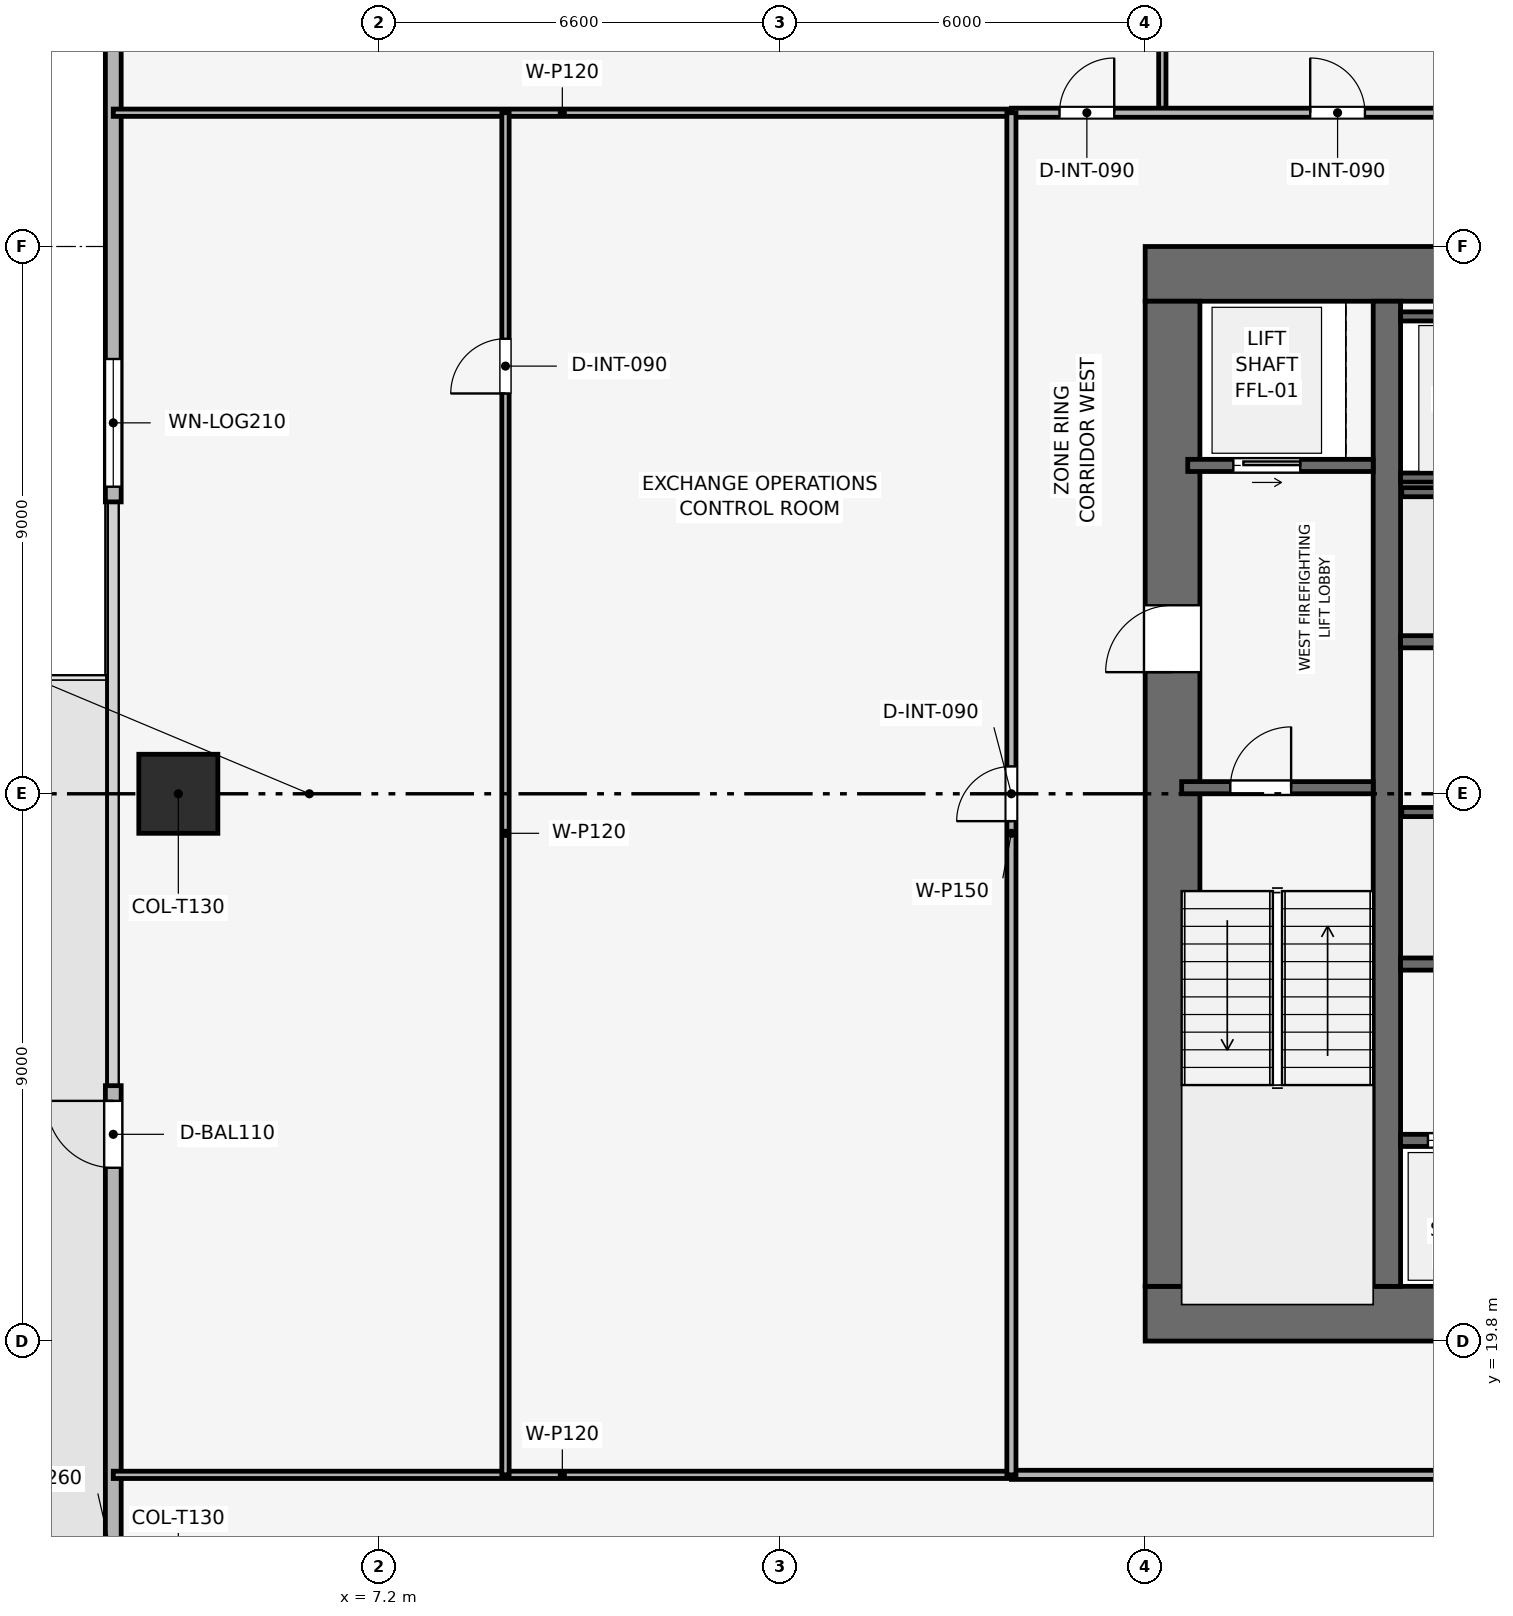
"""IFC4 building model, lengths in metres.
Left out: names, types, materials, properties, quantities, classifications, styles, units other than length and angle.
Written with IfcOpenShell. Run it as: python <this file> out.ifc"""

import sys

from ifc_helpers import new_model, si_unit, direction, frame, frame_2d, origin, origin_2d, place, context, subcontext, project, spatial, rectangle, extrude, element, fill, save


model = new_model("IFC4")
c1 = context("Model", 3, precision=1e-05, world=origin(), true_north=direction((0.0, 1.0)))
c2 = subcontext(c1, "Body", "Model", "MODEL_VIEW")
j1 = project(units=[si_unit("LENGTHUNIT", "METRE"), si_unit("PLANEANGLEUNIT", "RADIAN")], contexts=[c1])
p1 = place(None, origin())
s1 = spatial("IfcSite", under=j1, at=p1, CompositionType="ELEMENT")
p2 = place(p1, origin())
s2 = spatial("IfcBuilding", under=s1, at=p2, CompositionType="ELEMENT")
p3 = place(p2, frame((0.0, 0.0, 129.0)))
s3 = spatial("IfcBuildingStorey", under=s2, at=p3, CompositionType="ELEMENT", Elevation=129.0)
p4 = place(p3, frame((19.8, 20.25, 0.0), z_axis=(0.0, 0.0, 1.0), x_axis=(1.0, 0.0, 0.0)))
e1 = element("IfcWall", 1, at=p4, inside=s3, PredefinedType="SHEAR", context=c2, shape_type="SweptSolid", body=[
    extrude(rectangle(XDim=18.0, YDim=0.9, at=frame_2d((9.0, 0.0))), origin(), (0.0, 0.0, 1.0), 3.9),
])
p5 = place(p4, frame((8.4, 0.0, 0.0)))
e2 = element("IfcOpeningElement", 2, at=p5, cuts=e1, PredefinedType="OPENING", context=c2, shape_type="SweptSolid", body=[
    extrude(rectangle(XDim=1.2, YDim=2.2, at=frame_2d((0.6, 1.1))), frame((0.0, 0.46, 0.0), z_axis=(0.0, -1.0, 0.0), x_axis=(1.0, 0.0, 0.0)), (0.0, 0.0, 1.0), 0.92),
])
p6 = place(p3, frame((19.8, 37.35, 0.0), z_axis=(0.0, 0.0, 1.0), x_axis=(1.0, 0.0, 0.0)))
e3 = element("IfcWall", 3, at=p6, inside=s3, PredefinedType="SHEAR", context=c2, shape_type="SweptSolid", body=[
    extrude(rectangle(XDim=18.0, YDim=0.9, at=frame_2d((9.0, 0.0))), origin(), (0.0, 0.0, 1.0), 3.9),
])
p7 = place(p6, frame((7.05, 0.0, 0.0)))
e4 = element("IfcOpeningElement", 4, at=p7, cuts=e3, PredefinedType="OPENING", context=c2, shape_type="SweptSolid", body=[
    extrude(rectangle(XDim=1.1, YDim=2.15, at=frame_2d((0.55, 1.075))), frame((0.0, 0.46, 0.0), z_axis=(0.0, -1.0, 0.0), x_axis=(1.0, 0.0, 0.0)), (0.0, 0.0, 1.0), 0.92),
])
p8 = place(p3, frame((20.25, 20.7, 0.0), z_axis=(0.0, 0.0, 1.0), x_axis=(0.0, 1.0, 0.0)))
e5 = element("IfcWall", 5, at=p8, inside=s3, PredefinedType="SHEAR", context=c2, shape_type="SweptSolid", body=[
    extrude(rectangle(XDim=16.2, YDim=0.9, at=frame_2d((8.1, 0.0))), origin(), (0.0, 0.0, 1.0), 3.9),
])
p9 = place(p8, frame((10.1, 0.0, 0.0)))
e6 = element("IfcOpeningElement", 6, at=p9, cuts=e5, PredefinedType="OPENING", context=c2, shape_type="SweptSolid", body=[
    extrude(rectangle(XDim=1.1, YDim=2.15, at=frame_2d((0.55, 1.075))), frame((0.0, 0.46, 0.0), z_axis=(0.0, -1.0, 0.0), x_axis=(1.0, 0.0, 0.0)), (0.0, 0.0, 1.0), 0.92),
])
p10 = place(p3, frame((23.775, 20.7, 0.0), z_axis=(0.0, 0.0, 1.0), x_axis=(0.0, 1.0, 0.0)))
e7 = element("IfcWall", 7, at=p10, inside=s3, PredefinedType="SHEAR", context=c2, shape_type="SweptSolid", body=[
    extrude(rectangle(XDim=16.2, YDim=0.45, at=frame_2d((8.1, 0.0))), origin(), (0.0, 0.0, 1.0), 3.9),
])
p11 = place(p3, frame((3.9, 28.8, 0.003), z_axis=(0.0, 0.0, 1.0), x_axis=(1.0, 0.0, 0.0)))
e8 = element("IfcColumn", 8, at=p11, inside=s3, PredefinedType="COLUMN", context=c2, shape_type="SweptSolid", body=[
    extrude(rectangle(XDim=1.3, YDim=1.3, at=origin_2d()), origin(), (0.0, 0.0, 1.0), 3.644),
])
p12 = place(p3, frame((2.83, 9.9, 0.0), z_axis=(0.0, 0.0, 1.0), x_axis=(0.0, 1.0, 0.0)))
e9 = element("IfcWall", 9, at=p12, inside=s3, PredefinedType="SOLIDWALL", context=c2, shape_type="SweptSolid", body=[
    extrude(rectangle(XDim=14.1, YDim=0.26, at=frame_2d((7.05, 0.0))), origin(), (0.0, 0.0, 1.0), 3.65),
])
p13 = place(p12, frame((12.75, 0.0, 0.0)))
e10 = element("IfcOpeningElement", 10, at=p13, cuts=e9, PredefinedType="OPENING", context=c2, shape_type="SweptSolid", body=[
    extrude(rectangle(XDim=1.1, YDim=2.2, at=frame_2d((0.55, 1.1))), frame((0.0, 0.14, 0.0), z_axis=(0.0, -1.0, 0.0), x_axis=(1.0, 0.0, 0.0)), (0.0, 0.0, 1.0), 0.28),
])
p14 = place(p3, frame((2.83, 33.6, 0.0), z_axis=(0.0, 0.0, 1.0), x_axis=(0.0, 1.0, 0.0)))
e11 = element("IfcWall", 11, at=p14, inside=s3, PredefinedType="SOLIDWALL", context=c2, shape_type="SweptSolid", body=[
    extrude(rectangle(XDim=14.1, YDim=0.26, at=frame_2d((7.05, 0.0))), origin(), (0.0, 0.0, 1.0), 3.65),
])
p15 = place(p14, frame((0.25, 0.0, 0.72)))
e12 = element("IfcOpeningElement", 12, at=p15, cuts=e11, PredefinedType="OPENING", context=c2, shape_type="SweptSolid", body=[
    extrude(rectangle(XDim=2.1, YDim=2.1, at=frame_2d((1.05, 1.05))), frame((0.0, 0.14, 0.0), z_axis=(0.0, -1.0, 0.0), x_axis=(1.0, 0.0, 0.0)), (0.0, 0.0, 1.0), 0.28),
])
p16 = place(p3, frame((20.4, 28.9, 0.0), z_axis=(0.0, 0.0, 1.0), x_axis=(1.0, 0.0, 0.0)))
e13 = element("IfcWall", 13, at=p16, inside=s3, PredefinedType="SHEAR", context=c2, shape_type="SweptSolid", body=[
    extrude(rectangle(XDim=3.15, YDim=0.2, at=frame_2d((1.575, 0.0))), origin(), (0.0, 0.0, 1.0), 3.65),
])
p17 = place(p16, frame((0.8, 0.0, 0.0)))
e14 = element("IfcOpeningElement", 14, at=p17, cuts=e13, PredefinedType="OPENING", context=c2, shape_type="SweptSolid", body=[
    extrude(rectangle(XDim=1.0, YDim=2.1, at=frame_2d((0.5, 1.05))), frame((0.0, 0.11, 0.0), z_axis=(0.0, -1.0, 0.0), x_axis=(1.0, 0.0, 0.0)), (0.0, 0.0, 1.0), 0.22),
])
p18 = place(p3, frame((20.5, 34.2, 0.0), z_axis=(0.0, 0.0, 1.0), x_axis=(1.0, 0.0, 0.0)))
e15 = element("IfcWall", 15, at=p18, inside=s3, PredefinedType="SHEAR", context=c2, shape_type="SweptSolid", body=[
    extrude(rectangle(XDim=3.05, YDim=0.2, at=frame_2d((1.525, 0.0))), origin(), (0.0, 0.0, 1.0), 3.65),
])
p19 = place(p18, frame((0.75, 0.0, 0.0)))
e16 = element("IfcOpeningElement", 16, at=p19, cuts=e15, PredefinedType="OPENING", context=c2, shape_type="SweptSolid", body=[
    extrude(rectangle(XDim=1.1, YDim=2.15, at=frame_2d((0.55, 1.075))), frame((0.0, 0.11, 0.0), z_axis=(0.0, -1.0, 0.0), x_axis=(1.0, 0.0, 0.0)), (0.0, 0.0, 1.0), 0.22),
])
for number, where, z_axis, x_axis in (
    (17, (24.0, 34.0, 0.0), (0.0, 0.0, 1.0), (1.0, 0.0, 0.0)),
    (18, (24.0, 36.65, 0.0), (0.0, 0.0, 1.0), (1.0, 0.0, 0.0)),
):
    element("IfcWall", number, at=place(p3, frame(where, z_axis=z_axis, x_axis=x_axis)), inside=s3, PredefinedType="SHEAR", context=c2, shape_type="SweptSolid", body=[
        extrude(rectangle(XDim=2.48, YDim=0.15, at=frame_2d((1.24, 0.0))), origin(), (0.0, 0.0, 1.0), 3.65),
    ])
p20 = place(p3, frame((24.0, 23.1, 0.0), z_axis=(0.0, 0.0, 1.0), x_axis=(1.0, 0.0, 0.0)))
e19 = element("IfcWall", 19, at=p20, inside=s3, PredefinedType="SHEAR", context=c2, shape_type="SweptSolid", body=[
    extrude(rectangle(XDim=2.0, YDim=0.2, at=frame_2d((1.0, 0.0))), origin(), (0.0, 0.0, 1.0), 3.65),
])
p21 = place(p20, frame((0.45, 0.0, 0.0)))
e20 = element("IfcOpeningElement", 20, at=p21, cuts=e19, PredefinedType="OPENING", context=c2, shape_type="SweptSolid", body=[
    extrude(rectangle(XDim=1.1, YDim=2.15, at=frame_2d((0.55, 1.075))), frame((0.0, 0.11, 0.0), z_axis=(0.0, -1.0, 0.0), x_axis=(1.0, 0.0, 0.0)), (0.0, 0.0, 1.0), 0.22),
])
for number, where, z_axis, x_axis in (
    (21, (24.0, 26.0, 0.0), (0.0, 0.0, 1.0), (1.0, 0.0, 0.0)),
    (22, (24.0, 31.3, 0.0), (0.0, 0.0, 1.0), (1.0, 0.0, 0.0)),
):
    element("IfcWall", number, at=place(p3, frame(where, z_axis=z_axis, x_axis=x_axis)), inside=s3, PredefinedType="SHEAR", context=c2, shape_type="SweptSolid", body=[
        extrude(rectangle(XDim=2.0, YDim=0.2, at=frame_2d((1.0, 0.0))), origin(), (0.0, 0.0, 1.0), 3.65),
    ])
for number, where, z_axis, x_axis in (
    (23, (24.02, 28.5, 0.0), (0.0, 0.0, 1.0), (1.0, 0.0, 0.0)),
    (24, (24.02, 33.76, 0.0), (0.0, 0.0, 1.0), (1.0, 0.0, 0.0)),
):
    element("IfcWall", number, at=place(p3, frame(where, z_axis=z_axis, x_axis=x_axis)), inside=s3, PredefinedType="SHEAR", context=c2, shape_type="SweptSolid", body=[
        extrude(rectangle(XDim=4.08, YDim=0.15, at=frame_2d((2.04, 0.0))), origin(), (0.0, 0.0, 1.0), 3.65),
    ])
for number, where, z_axis, x_axis in (
    (25, (20.082, 40.0, 0.0), (0.0, 0.0, 1.0), (0.0, 1.0, 0.0)),
    (26, (2.83, 17.6, 0.0), (0.0, 0.0, 1.0), (1.0, 0.0, 0.0)),
    (27, (2.83, 40.0, 0.0), (0.0, 0.0, 1.0), (1.0, 0.0, 0.0)),
):
    element("IfcWall", number, at=place(p3, frame(where, z_axis=z_axis, x_axis=x_axis)), inside=s3, PredefinedType="PARTITIONING", context=c2, shape_type="SweptSolid", body=[
        extrude(rectangle(XDim=14.77, YDim=0.12, at=frame_2d((7.385, 0.0))), origin(), (0.0, 0.0, 1.0), 2.835),
    ])
p22 = place(p3, frame((9.28, 17.6, 0.0), z_axis=(0.0, 0.0, 1.0), x_axis=(0.0, 1.0, 0.0)))
e28 = element("IfcWall", 28, at=p22, inside=s3, PredefinedType="PARTITIONING", context=c2, shape_type="SweptSolid", body=[
    extrude(rectangle(XDim=22.4, YDim=0.12, at=frame_2d((11.2, 0.0))), origin(), (0.0, 0.0, 1.0), 3.185),
])
p23 = place(p22, frame((17.783, 0.0, 0.0)))
e29 = element("IfcOpeningElement", 29, at=p23, cuts=e28, PredefinedType="OPENING", context=c2, shape_type="SweptSolid", body=[
    extrude(rectangle(XDim=0.9, YDim=2.1, at=frame_2d((0.45, 1.05))), frame((0.0, 0.07, 0.0), z_axis=(0.0, -1.0, 0.0), x_axis=(1.0, 0.0, 0.0)), (0.0, 0.0, 1.0), 0.14),
])
p24 = place(p3, frame((17.6, 17.6, 0.0), z_axis=(0.0, 0.0, 1.0), x_axis=(1.0, 0.0, 0.0)))
e30 = element("IfcWall", 30, at=p24, inside=s3, PredefinedType="PARTITIONING", context=c2, shape_type="SweptSolid", body=[
    extrude(rectangle(XDim=22.4, YDim=0.15, at=frame_2d((11.2, 0.0))), origin(), (0.0, 0.0, 1.0), 3.185),
])
p25 = place(p24, frame((10.75, 0.0, 0.0)))
e31 = element("IfcOpeningElement", 31, at=p25, cuts=e30, PredefinedType="OPENING", context=c2, shape_type="SweptSolid", body=[
    extrude(rectangle(XDim=0.9, YDim=2.1, at=frame_2d((0.45, 1.05))), frame((0.0, 0.085, 0.0), z_axis=(0.0, -1.0, 0.0), x_axis=(1.0, 0.0, 0.0)), (0.0, 0.0, 1.0), 0.17),
])
p26 = place(p3, frame((17.6, 40.0, 0.0), z_axis=(0.0, 0.0, 1.0), x_axis=(1.0, 0.0, 0.0)))
e32 = element("IfcWall", 32, at=p26, inside=s3, PredefinedType="PARTITIONING", context=c2, shape_type="SweptSolid", body=[
    extrude(rectangle(XDim=22.4, YDim=0.15, at=frame_2d((11.2, 0.0))), origin(), (0.0, 0.0, 1.0), 3.185),
])
p27 = place(p26, frame((0.791, 0.0, 0.0)))
e33 = element("IfcOpeningElement", 33, at=p27, cuts=e32, PredefinedType="OPENING", context=c2, shape_type="SweptSolid", body=[
    extrude(rectangle(XDim=0.9, YDim=2.1, at=frame_2d((0.45, 1.05))), frame((0.0, 0.085, 0.0), z_axis=(0.0, -1.0, 0.0), x_axis=(1.0, 0.0, 0.0)), (0.0, 0.0, 1.0), 0.17),
])
p28 = place(p26, frame((4.914, 0.0, 0.0)))
e34 = element("IfcOpeningElement", 34, at=p28, cuts=e32, PredefinedType="OPENING", context=c2, shape_type="SweptSolid", body=[
    extrude(rectangle(XDim=0.9, YDim=2.1, at=frame_2d((0.45, 1.05))), frame((0.0, 0.085, 0.0), z_axis=(0.0, -1.0, 0.0), x_axis=(1.0, 0.0, 0.0)), (0.0, 0.0, 1.0), 0.17),
])
p29 = place(p26, frame((10.678, 0.0, 0.0)))
e35 = element("IfcOpeningElement", 35, at=p29, cuts=e32, PredefinedType="OPENING", context=c2, shape_type="SweptSolid", body=[
    extrude(rectangle(XDim=0.9, YDim=2.1, at=frame_2d((0.45, 1.05))), frame((0.0, 0.085, 0.0), z_axis=(0.0, -1.0, 0.0), x_axis=(1.0, 0.0, 0.0)), (0.0, 0.0, 1.0), 0.17),
])
p30 = place(p26, frame((17.755, 0.0, 0.0)))
e36 = element("IfcOpeningElement", 36, at=p30, cuts=e32, PredefinedType="OPENING", context=c2, shape_type="SweptSolid", body=[
    extrude(rectangle(XDim=0.9, YDim=2.1, at=frame_2d((0.45, 1.05))), frame((0.0, 0.085, 0.0), z_axis=(0.0, -1.0, 0.0), x_axis=(1.0, 0.0, 0.0)), (0.0, 0.0, 1.0), 0.17),
])
p31 = place(p3, frame((17.6, 17.6, 0.0), z_axis=(0.0, 0.0, 1.0), x_axis=(0.0, 1.0, 0.0)))
e37 = element("IfcWall", 37, at=p31, inside=s3, PredefinedType="PARTITIONING", context=c2, shape_type="SweptSolid", body=[
    extrude(rectangle(XDim=22.4, YDim=0.15, at=frame_2d((11.2, 0.0))), origin(), (0.0, 0.0, 1.0), 3.185),
])
p32 = place(p31, frame((10.75, 0.0, 0.0)))
e38 = element("IfcOpeningElement", 38, at=p32, cuts=e37, PredefinedType="OPENING", context=c2, shape_type="SweptSolid", body=[
    extrude(rectangle(XDim=0.9, YDim=2.1, at=frame_2d((0.45, 1.05))), frame((0.0, 0.085, 0.0), z_axis=(0.0, -1.0, 0.0), x_axis=(1.0, 0.0, 0.0)), (0.0, 0.0, 1.0), 0.17),
])
p33 = place(p13, origin())
e39 = element("IfcDoor", 39, at=p33, inside=s3, OperationType="SINGLE_SWING_RIGHT", PredefinedType="DOOR", context=c2, shape_type="SweptSolid", body=[
    extrude(rectangle(XDim=1.1, YDim=2.2, at=frame_2d((0.55, 1.1))), frame((0.0, 0.025, 0.0), z_axis=(0.0, -1.0, 0.0), x_axis=(1.0, 0.0, 0.0)), (0.0, 0.0, 1.0), 0.05),
])
fill(e10, e39)
p34 = place(p15, origin())
e40 = element("IfcWindow", 40, at=p34, inside=s3, PartitioningType="SINGLE_PANEL", PredefinedType="WINDOW", context=c2, shape_type="SweptSolid", body=[
    extrude(rectangle(XDim=2.1, YDim=2.1, at=frame_2d((1.05, 1.05))), frame((0.0, 0.03, 0.0), z_axis=(0.0, -1.0, 0.0), x_axis=(1.0, 0.0, 0.0)), (0.0, 0.0, 1.0), 0.06),
])
fill(e12, e40)
p35 = place(p17, origin())
e41 = element("IfcDoor", 41, at=p35, inside=s3, OperationType="SINGLE_SWING_RIGHT", PredefinedType="DOOR", context=c2, shape_type="SweptSolid", body=[
    extrude(rectangle(XDim=1.0, YDim=2.1, at=frame_2d((0.5, 1.05))), frame((0.0, 0.025, 0.0), z_axis=(0.0, -1.0, 0.0), x_axis=(1.0, 0.0, 0.0)), (0.0, 0.0, 1.0), 0.05),
])
fill(e14, e41)
p36 = place(p19, origin())
e42 = element("IfcDoor", 42, at=p36, inside=s3, OperationType="SLIDING_TO_RIGHT", PredefinedType="DOOR", context=c2, shape_type="SweptSolid", body=[
    extrude(rectangle(XDim=1.1, YDim=2.15, at=frame_2d((0.55, 1.075))), frame((0.0, 0.025, 0.0), z_axis=(0.0, -1.0, 0.0), x_axis=(1.0, 0.0, 0.0)), (0.0, 0.0, 1.0), 0.05),
])
fill(e16, e42)
p37 = place(p21, origin())
e43 = element("IfcDoor", 43, at=p37, inside=s3, OperationType="SLIDING_TO_RIGHT", PredefinedType="DOOR", context=c2, shape_type="SweptSolid", body=[
    extrude(rectangle(XDim=1.1, YDim=2.15, at=frame_2d((0.55, 1.075))), frame((0.0, 0.025, 0.0), z_axis=(0.0, -1.0, 0.0), x_axis=(1.0, 0.0, 0.0)), (0.0, 0.0, 1.0), 0.05),
])
fill(e20, e43)
p38 = place(p23, origin())
e44 = element("IfcDoor", 44, at=p38, inside=s3, OperationType="SINGLE_SWING_LEFT", PredefinedType="DOOR", context=c2, shape_type="SweptSolid", body=[
    extrude(rectangle(XDim=0.9, YDim=2.1, at=frame_2d((0.45, 1.05))), frame((0.0, 0.025, 0.0), z_axis=(0.0, -1.0, 0.0), x_axis=(1.0, 0.0, 0.0)), (0.0, 0.0, 1.0), 0.05),
])
fill(e29, e44)
p39 = place(p27, origin())
e45 = element("IfcDoor", 45, at=p39, inside=s3, OperationType="SINGLE_SWING_RIGHT", PredefinedType="DOOR", context=c2, shape_type="SweptSolid", body=[
    extrude(rectangle(XDim=0.9, YDim=2.1, at=frame_2d((0.45, 1.05))), frame((0.0, 0.025, 0.0), z_axis=(0.0, -1.0, 0.0), x_axis=(1.0, 0.0, 0.0)), (0.0, 0.0, 1.0), 0.05),
])
fill(e33, e45)
p40 = place(p28, origin())
e46 = element("IfcDoor", 46, at=p40, inside=s3, OperationType="SINGLE_SWING_LEFT", PredefinedType="DOOR", context=c2, shape_type="SweptSolid", body=[
    extrude(rectangle(XDim=0.9, YDim=2.1, at=frame_2d((0.45, 1.05))), frame((0.0, 0.025, 0.0), z_axis=(0.0, -1.0, 0.0), x_axis=(1.0, 0.0, 0.0)), (0.0, 0.0, 1.0), 0.05),
])
fill(e34, e46)
p41 = place(p32, origin())
e47 = element("IfcDoor", 47, at=p41, inside=s3, OperationType="SINGLE_SWING_LEFT", PredefinedType="DOOR", context=c2, shape_type="SweptSolid", body=[
    extrude(rectangle(XDim=0.9, YDim=2.1, at=frame_2d((0.45, 1.05))), frame((0.0, 0.025, 0.0), z_axis=(0.0, -1.0, 0.0), x_axis=(1.0, 0.0, 0.0)), (0.0, 0.0, 1.0), 0.05),
])
fill(e38, e47)
p42 = place(p9, origin())
e48 = element("IfcDoor", 48, at=p42, inside=s3, OperationType="SINGLE_SWING_LEFT", PredefinedType="DOOR", context=c2, shape_type="SweptSolid", body=[
    extrude(rectangle(XDim=1.1, YDim=2.15, at=frame_2d((0.55, 1.075))), frame((0.0, 0.025, 0.0), z_axis=(0.0, -1.0, 0.0), x_axis=(1.0, 0.0, 0.0)), (0.0, 0.0, 1.0), 0.05),
])
fill(e6, e48)
save(model, sys.argv[1])
